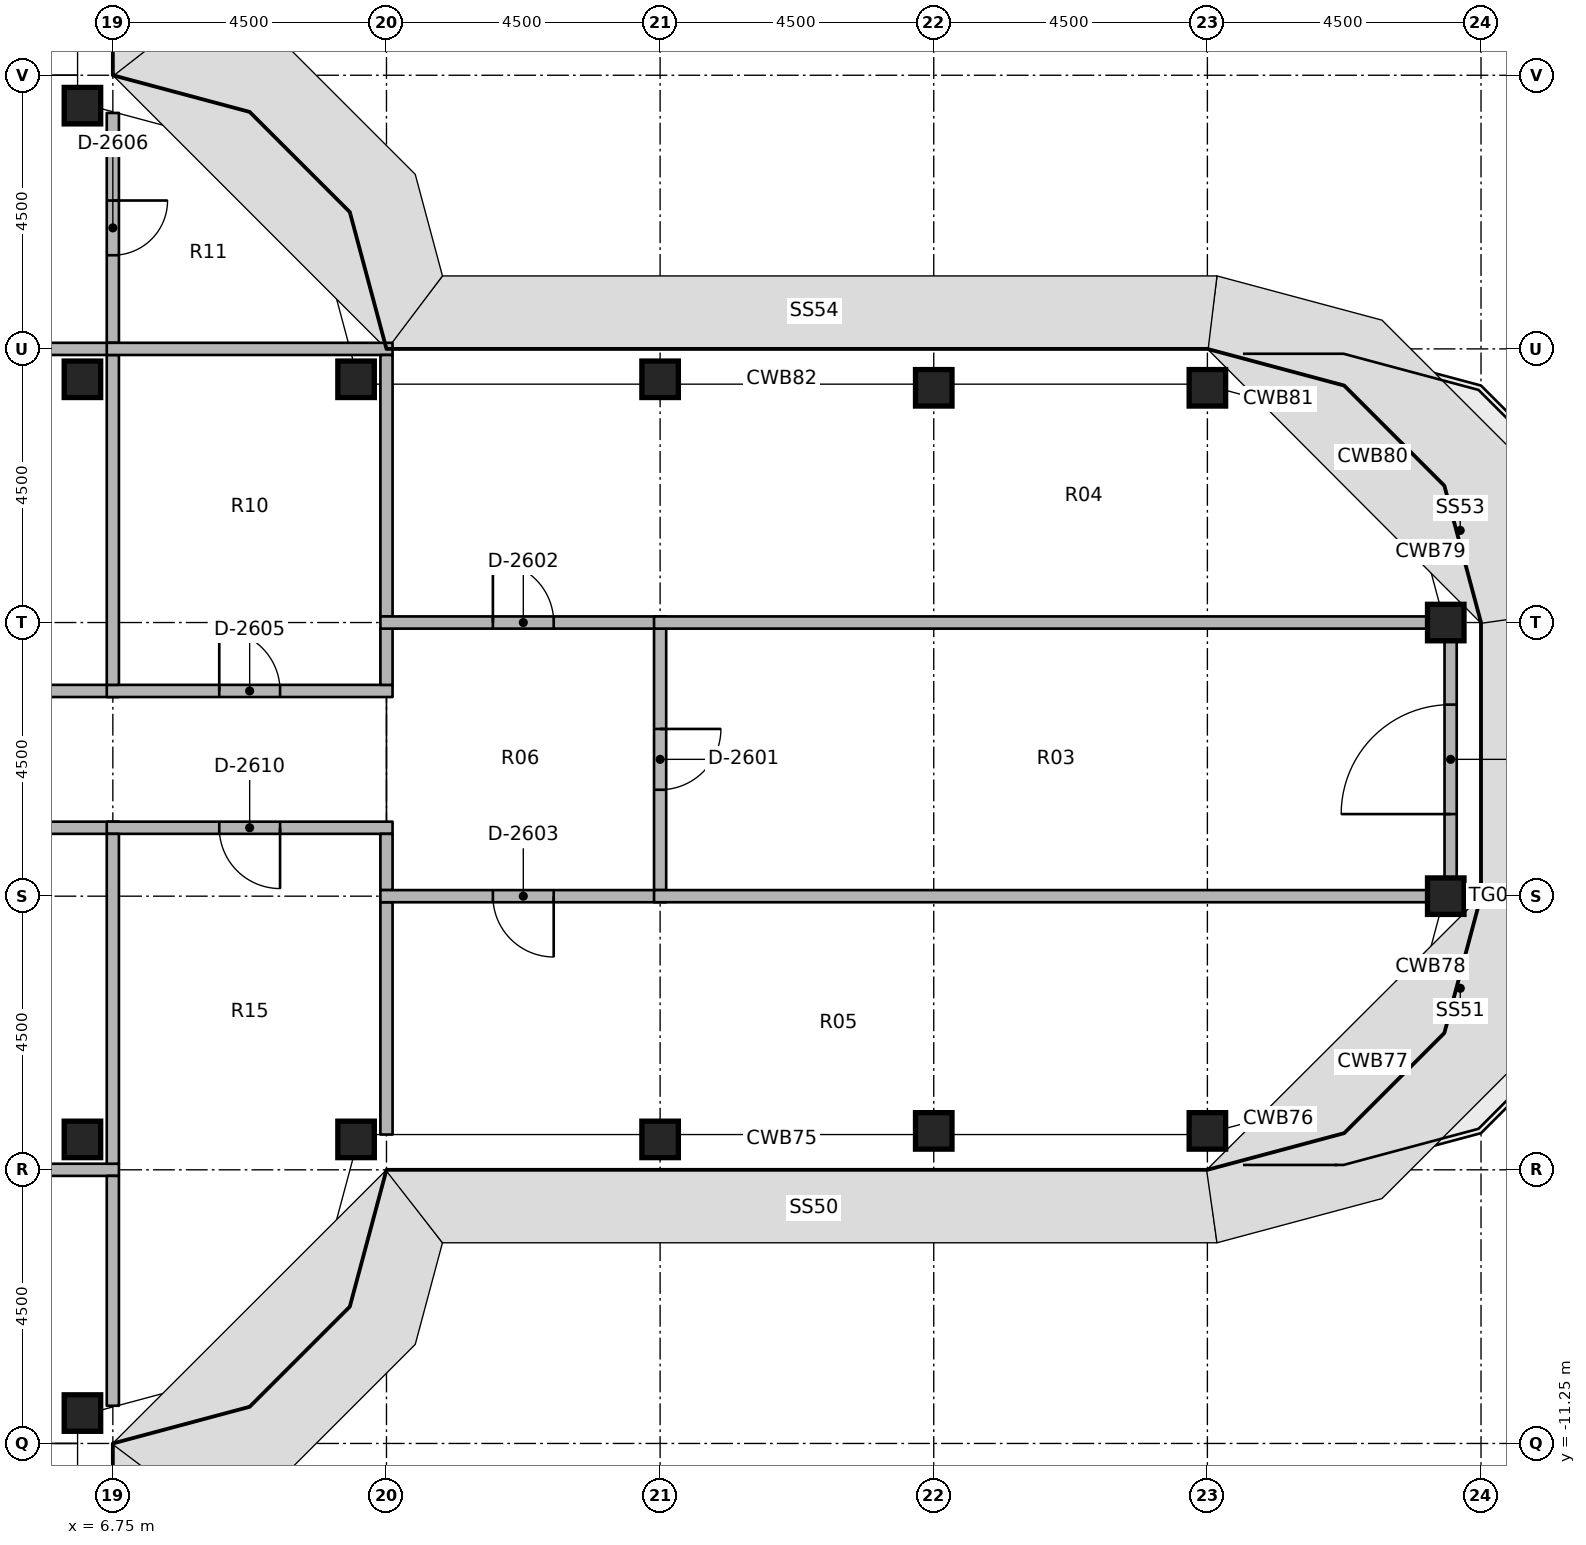
"""IFC4 building model, lengths in metres.
Left out: names, types, materials, properties, quantities, classifications, styles, units other than length and angle.
Written with IfcOpenShell. Run it as: python <this file> out.ifc"""

import sys

from ifc_helpers import new_model, si_unit, direction, frame, frame_2d, origin, origin_2d, place, context, subcontext, project, spatial, rectangle, extrude, element, fill, save


model = new_model("IFC4")
c1 = context("Model", 3, precision=1e-05, world=origin(), true_north=direction((0.0, 1.0)))
c2 = subcontext(c1, "Body", "Model", "MODEL_VIEW")
j1 = project(units=[si_unit("LENGTHUNIT", "METRE"), si_unit("PLANEANGLEUNIT", "RADIAN")], contexts=[c1])
p1 = place(None, origin())
s1 = spatial("IfcSite", under=j1, at=p1, CompositionType="ELEMENT")
p2 = place(p1, origin())
s2 = spatial("IfcBuilding", under=s1, at=p2, CompositionType="ELEMENT")
p3 = place(p2, frame((0.0, 0.0, 249.8)))
s3 = spatial("IfcBuildingStorey", under=s2, at=p3, CompositionType="ELEMENT", Elevation=249.8)
for number, where, z_axis, x_axis in (
    (1, (6.25, -10.75, 0.0), (0.0, 0.0, 1.0), (1.0, 0.0, 0.0)),
    (2, (6.25, -6.25, 0.0), (0.0, 0.0, 1.0), (1.0, 0.0, 0.0)),
    (3, (6.25, 6.25, 0.0), (0.0, 0.0, 1.0), (1.0, 0.0, 0.0)),
    (4, (6.25, 10.75, 0.0), (0.0, 0.0, 1.0), (1.0, 0.0, 0.0)),
    (5, (10.75, -6.25, 0.0), (0.0, 0.0, 1.0), (1.0, 0.0, 0.0)),
    (6, (10.75, 6.25, 0.0), (0.0, 0.0, 1.0), (1.0, 0.0, 0.0)),
    (7, (15.75, -6.25, 0.0), (0.0, 0.0, 1.0), (1.0, 0.0, 0.0)),
    (8, (15.75, 6.25, 0.0), (0.0, 0.0, 1.0), (1.0, 0.0, 0.0)),
    (9, (20.25, -6.11, 0.0), (0.0, 0.0, 1.0), (1.0, 0.0, 0.0)),
    (10, (20.25, 6.11, 0.0), (0.0, 0.0, 1.0), (1.0, 0.0, 0.0)),
    (11, (24.75, -6.11, 0.0), (0.0, 0.0, 1.0), (1.0, 0.0, 0.0)),
    (12, (24.75, 6.11, 0.0), (0.0, 0.0, 1.0), (1.0, 0.0, 0.0)),
    (13, (28.67, -2.25, 0.0), (0.0, 0.0, 1.0), (1.0, 0.0, 0.0)),
    (14, (28.67, 2.25, 0.0), (0.0, 0.0, 1.0), (1.0, 0.0, 0.0)),
):
    element("IfcColumn", number, at=place(p3, frame(where, z_axis=z_axis, x_axis=x_axis)), inside=s3, PredefinedType="COLUMN", context=c2, shape_type="SweptSolid", body=[
        extrude(rectangle(XDim=0.6, YDim=0.6, at=origin_2d()), origin(), (0.0, 0.0, 1.0), 3.65),
    ])
p4 = place(p3, frame((28.75, -1.95, 0.0), z_axis=(0.0, 0.0, 1.0), x_axis=(0.0, 1.0, 0.0)))
e15 = element("IfcWall", 15, at=p4, inside=s3, PredefinedType="SOLIDWALL", context=c2, shape_type="SweptSolid", body=[
    extrude(rectangle(XDim=3.9, YDim=0.2, at=frame_2d((1.95, 0.0))), origin(), (0.0, 0.0, 1.0), 2.75),
])
p5 = place(p4, frame((1.05, 0.0, 0.0)))
e16 = element("IfcOpeningElement", 16, at=p5, cuts=e15, PredefinedType="OPENING", context=c2, shape_type="SweptSolid", body=[
    extrude(rectangle(XDim=1.8, YDim=2.4, at=frame_2d((0.9, 1.2))), frame((0.0, 0.11, 0.0), z_axis=(0.0, -1.0, 0.0), x_axis=(1.0, 0.0, 0.0)), (0.0, 0.0, 1.0), 0.22),
])
p6 = place(p3, frame((1.025, 1.125, 0.0), z_axis=(0.0, 0.0, 1.0), x_axis=(1.0, 0.0, 0.0)))
e17 = element("IfcWall", 17, at=p6, inside=s3, PredefinedType="PARTITIONING", context=c2, shape_type="SweptSolid", body=[
    extrude(rectangle(XDim=5.825, YDim=0.2, at=frame_2d((2.913, 0.0))), origin(), (0.0, 0.0, 1.0), 2.75),
])
p7 = place(p6, frame((2.413, 0.0, 0.0)))
e18 = element("IfcOpeningElement", 18, at=p7, cuts=e17, PredefinedType="OPENING", context=c2, shape_type="SweptSolid", body=[
    extrude(rectangle(XDim=1.0, YDim=2.1, at=frame_2d((0.5, 1.05))), frame((0.0, 0.11, 0.0), z_axis=(0.0, -1.0, 0.0), x_axis=(1.0, 0.0, 0.0)), (0.0, 0.0, 1.0), 0.22),
])
p8 = place(p3, frame((6.65, 1.125, 0.0), z_axis=(0.0, 0.0, 1.0), x_axis=(1.0, 0.0, 0.0)))
e19 = element("IfcWall", 19, at=p8, inside=s3, PredefinedType="PARTITIONING", context=c2, shape_type="SweptSolid", body=[
    extrude(rectangle(XDim=4.7, YDim=0.2, at=frame_2d((2.35, 0.0))), origin(), (0.0, 0.0, 1.0), 2.75),
])
p9 = place(p8, frame((1.85, 0.0, 0.0)))
e20 = element("IfcOpeningElement", 20, at=p9, cuts=e19, PredefinedType="OPENING", context=c2, shape_type="SweptSolid", body=[
    extrude(rectangle(XDim=1.0, YDim=2.1, at=frame_2d((0.5, 1.05))), frame((0.0, 0.11, 0.0), z_axis=(0.0, -1.0, 0.0), x_axis=(1.0, 0.0, 0.0)), (0.0, 0.0, 1.0), 0.22),
])
p10 = place(p3, frame((6.85, -1.125, 0.0), z_axis=(0.0, 0.0, 1.0), x_axis=(-1.0, 0.0, 0.0)))
e21 = element("IfcWall", 21, at=p10, inside=s3, PredefinedType="PARTITIONING", context=c2, shape_type="SweptSolid", body=[
    extrude(rectangle(XDim=5.825, YDim=0.2, at=frame_2d((2.913, 0.0))), origin(), (0.0, 0.0, 1.0), 2.75),
])
p11 = place(p10, frame((2.413, 0.0, 0.0)))
e22 = element("IfcOpeningElement", 22, at=p11, cuts=e21, PredefinedType="OPENING", context=c2, shape_type="SweptSolid", body=[
    extrude(rectangle(XDim=1.0, YDim=2.1, at=frame_2d((0.5, 1.05))), frame((0.0, 0.11, 0.0), z_axis=(0.0, -1.0, 0.0), x_axis=(1.0, 0.0, 0.0)), (0.0, 0.0, 1.0), 0.22),
])
p12 = place(p3, frame((11.35, -1.125, 0.0), z_axis=(0.0, 0.0, 1.0), x_axis=(-1.0, 0.0, 0.0)))
e23 = element("IfcWall", 23, at=p12, inside=s3, PredefinedType="PARTITIONING", context=c2, shape_type="SweptSolid", body=[
    extrude(rectangle(XDim=4.7, YDim=0.2, at=frame_2d((2.35, 0.0))), origin(), (0.0, 0.0, 1.0), 2.75),
])
p13 = place(p12, frame((1.85, 0.0, 0.0)))
e24 = element("IfcOpeningElement", 24, at=p13, cuts=e23, PredefinedType="OPENING", context=c2, shape_type="SweptSolid", body=[
    extrude(rectangle(XDim=1.0, YDim=2.1, at=frame_2d((0.5, 1.05))), frame((0.0, 0.11, 0.0), z_axis=(0.0, -1.0, 0.0), x_axis=(1.0, 0.0, 0.0)), (0.0, 0.0, 1.0), 0.22),
])
p14 = place(p3, frame((1.025, 6.75, 0.0), z_axis=(0.0, 0.0, 1.0), x_axis=(1.0, 0.0, 0.0)))
e25 = element("IfcWall", 25, at=p14, inside=s3, PredefinedType="PARTITIONING", context=c2, shape_type="SweptSolid", body=[
    extrude(rectangle(XDim=5.825, YDim=0.2, at=frame_2d((2.913, 0.0))), origin(), (0.0, 0.0, 1.0), 2.75),
])
p15 = place(p3, frame((6.75, 10.63, 0.0), z_axis=(0.0, 0.0, 1.0), x_axis=(0.0, -1.0, 0.0)))
e26 = element("IfcWall", 26, at=p15, inside=s3, PredefinedType="PARTITIONING", context=c2, shape_type="SweptSolid", body=[
    extrude(rectangle(XDim=3.78, YDim=0.2, at=frame_2d((1.89, 0.0))), origin(), (0.0, 0.0, 1.0), 2.75),
])
p16 = place(p15, frame((1.44, 0.0, 0.0)))
e27 = element("IfcOpeningElement", 27, at=p16, cuts=e26, PredefinedType="OPENING", context=c2, shape_type="SweptSolid", body=[
    extrude(rectangle(XDim=0.9, YDim=2.1, at=frame_2d((0.45, 1.05))), frame((0.0, 0.11, 0.0), z_axis=(0.0, -1.0, 0.0), x_axis=(1.0, 0.0, 0.0)), (0.0, 0.0, 1.0), 0.22),
])
p17 = place(p3, frame((1.025, -6.75, 0.0), z_axis=(0.0, 0.0, 1.0), x_axis=(1.0, 0.0, 0.0)))
e28 = element("IfcWall", 28, at=p17, inside=s3, PredefinedType="PARTITIONING", context=c2, shape_type="SweptSolid", body=[
    extrude(rectangle(XDim=5.825, YDim=0.2, at=frame_2d((2.913, 0.0))), origin(), (0.0, 0.0, 1.0), 2.75),
])
p18 = place(p3, frame((6.75, -10.63, 0.0), z_axis=(0.0, 0.0, 1.0), x_axis=(0.0, 1.0, 0.0)))
e29 = element("IfcWall", 29, at=p18, inside=s3, PredefinedType="PARTITIONING", context=c2, shape_type="SweptSolid", body=[
    extrude(rectangle(XDim=3.78, YDim=0.2, at=frame_2d((1.89, 0.0))), origin(), (0.0, 0.0, 1.0), 2.75),
])
p19 = place(p3, frame((6.75, 1.225, 0.0), z_axis=(0.0, 0.0, 1.0), x_axis=(0.0, 1.0, 0.0)))
e30 = element("IfcWall", 30, at=p19, inside=s3, PredefinedType="PARTITIONING", context=c2, shape_type="SweptSolid", body=[
    extrude(rectangle(XDim=5.425, YDim=0.2, at=frame_2d((2.712, 0.0))), origin(), (0.0, 0.0, 1.0), 2.75),
])
p20 = place(p3, frame((6.65, 6.75, 0.0), z_axis=(0.0, 0.0, 1.0), x_axis=(1.0, 0.0, 0.0)))
e31 = element("IfcWall", 31, at=p20, inside=s3, PredefinedType="PARTITIONING", context=c2, shape_type="SweptSolid", body=[
    extrude(rectangle(XDim=4.7, YDim=0.2, at=frame_2d((2.35, 0.0))), origin(), (0.0, 0.0, 1.0), 2.75),
])
p21 = place(p3, frame((11.25, 1.225, 0.0), z_axis=(0.0, 0.0, 1.0), x_axis=(0.0, 1.0, 0.0)))
e32 = element("IfcWall", 32, at=p21, inside=s3, PredefinedType="PARTITIONING", context=c2, shape_type="SweptSolid", body=[
    extrude(rectangle(XDim=0.925, YDim=0.2, at=frame_2d((0.462, 0.0))), origin(), (0.0, 0.0, 1.0), 2.75),
])
p22 = place(p3, frame((11.25, 2.35, 0.0), z_axis=(0.0, 0.0, 1.0), x_axis=(0.0, 1.0, 0.0)))
e33 = element("IfcWall", 33, at=p22, inside=s3, PredefinedType="PARTITIONING", context=c2, shape_type="SweptSolid", body=[
    extrude(rectangle(XDim=4.3, YDim=0.2, at=frame_2d((2.15, 0.0))), origin(), (0.0, 0.0, 1.0), 2.75),
])
p23 = place(p3, frame((6.75, -6.65, 0.0), z_axis=(0.0, 0.0, 1.0), x_axis=(0.0, 1.0, 0.0)))
e34 = element("IfcWall", 34, at=p23, inside=s3, PredefinedType="PARTITIONING", context=c2, shape_type="SweptSolid", body=[
    extrude(rectangle(XDim=5.425, YDim=0.2, at=frame_2d((2.712, 0.0))), origin(), (0.0, 0.0, 1.0), 2.75),
])
p24 = place(p3, frame((11.25, -2.15, 0.0), z_axis=(0.0, 0.0, 1.0), x_axis=(0.0, 1.0, 0.0)))
e35 = element("IfcWall", 35, at=p24, inside=s3, PredefinedType="PARTITIONING", context=c2, shape_type="SweptSolid", body=[
    extrude(rectangle(XDim=0.925, YDim=0.2, at=frame_2d((0.462, 0.0))), origin(), (0.0, 0.0, 1.0), 2.75),
])
p25 = place(p3, frame((11.25, -6.17, 0.0), z_axis=(0.0, 0.0, 1.0), x_axis=(0.0, 1.0, 0.0)))
e36 = element("IfcWall", 36, at=p25, inside=s3, PredefinedType="PARTITIONING", context=c2, shape_type="SweptSolid", body=[
    extrude(rectangle(XDim=3.82, YDim=0.2, at=frame_2d((1.91, 0.0))), origin(), (0.0, 0.0, 1.0), 2.75),
])
p26 = place(p3, frame((11.15, 2.25, 0.0), z_axis=(0.0, 0.0, 1.0), x_axis=(1.0, 0.0, 0.0)))
e37 = element("IfcWall", 37, at=p26, inside=s3, PredefinedType="PARTITIONING", context=c2, shape_type="SweptSolid", body=[
    extrude(rectangle(XDim=4.7, YDim=0.2, at=frame_2d((2.35, 0.0))), origin(), (0.0, 0.0, 1.0), 2.75),
])
p27 = place(p26, frame((1.85, 0.0, 0.0)))
e38 = element("IfcOpeningElement", 38, at=p27, cuts=e37, PredefinedType="OPENING", context=c2, shape_type="SweptSolid", body=[
    extrude(rectangle(XDim=1.0, YDim=2.1, at=frame_2d((0.5, 1.05))), frame((0.0, 0.11, 0.0), z_axis=(0.0, -1.0, 0.0), x_axis=(1.0, 0.0, 0.0)), (0.0, 0.0, 1.0), 0.22),
])
p28 = place(p3, frame((15.85, -2.25, 0.0), z_axis=(0.0, 0.0, 1.0), x_axis=(-1.0, 0.0, 0.0)))
e39 = element("IfcWall", 39, at=p28, inside=s3, PredefinedType="PARTITIONING", context=c2, shape_type="SweptSolid", body=[
    extrude(rectangle(XDim=4.7, YDim=0.2, at=frame_2d((2.35, 0.0))), origin(), (0.0, 0.0, 1.0), 2.75),
])
p29 = place(p28, frame((1.85, 0.0, 0.0)))
e40 = element("IfcOpeningElement", 40, at=p29, cuts=e39, PredefinedType="OPENING", context=c2, shape_type="SweptSolid", body=[
    extrude(rectangle(XDim=1.0, YDim=2.1, at=frame_2d((0.5, 1.05))), frame((0.0, 0.11, 0.0), z_axis=(0.0, -1.0, 0.0), x_axis=(1.0, 0.0, 0.0)), (0.0, 0.0, 1.0), 0.22),
])
p30 = place(p3, frame((15.75, 2.15, 0.0), z_axis=(0.0, 0.0, 1.0), x_axis=(0.0, -1.0, 0.0)))
e41 = element("IfcWall", 41, at=p30, inside=s3, PredefinedType="PARTITIONING", context=c2, shape_type="SweptSolid", body=[
    extrude(rectangle(XDim=4.3, YDim=0.2, at=frame_2d((2.15, 0.0))), origin(), (0.0, 0.0, 1.0), 2.75),
])
p31 = place(p30, frame((1.65, 0.0, 0.0)))
e42 = element("IfcOpeningElement", 42, at=p31, cuts=e41, PredefinedType="OPENING", context=c2, shape_type="SweptSolid", body=[
    extrude(rectangle(XDim=1.0, YDim=2.1, at=frame_2d((0.5, 1.05))), frame((0.0, 0.11, 0.0), z_axis=(0.0, -1.0, 0.0), x_axis=(1.0, 0.0, 0.0)), (0.0, 0.0, 1.0), 0.22),
])
for number, where, z_axis, x_axis in (
    (43, (15.65, 2.25, 0.0), (0.0, 0.0, 1.0), (1.0, 0.0, 0.0)),
    (44, (15.65, -2.25, 0.0), (0.0, 0.0, 1.0), (1.0, 0.0, 0.0)),
):
    element("IfcWall", number, at=place(p3, frame(where, z_axis=z_axis, x_axis=x_axis)), inside=s3, PredefinedType="PARTITIONING", context=c2, shape_type="SweptSolid", body=[
        extrude(rectangle(XDim=12.72, YDim=0.2, at=frame_2d((6.36, 0.0))), origin(), (0.0, 0.0, 1.0), 2.75),
    ])
p32 = place(p5, origin())
e45 = element("IfcDoor", 45, at=p32, inside=s3, OperationType="SINGLE_SWING_LEFT", PredefinedType="DOOR", context=c2, shape_type="SweptSolid", body=[
    extrude(rectangle(XDim=1.8, YDim=2.4, at=frame_2d((0.9, 1.2))), frame((0.0, 0.025, 0.0), z_axis=(0.0, -1.0, 0.0), x_axis=(1.0, 0.0, 0.0)), (0.0, 0.0, 1.0), 0.05),
])
fill(e16, e45)
p33 = place(p31, origin())
e46 = element("IfcDoor", 46, at=p33, inside=s3, OperationType="SINGLE_SWING_RIGHT", PredefinedType="DOOR", context=c2, shape_type="SweptSolid", body=[
    extrude(rectangle(XDim=1.0, YDim=2.1, at=frame_2d((0.5, 1.05))), frame((0.0, 0.025, 0.0), z_axis=(0.0, -1.0, 0.0), x_axis=(1.0, 0.0, 0.0)), (0.0, 0.0, 1.0), 0.05),
])
fill(e42, e46)
p34 = place(p27, origin())
e47 = element("IfcDoor", 47, at=p34, inside=s3, OperationType="SINGLE_SWING_RIGHT", PredefinedType="DOOR", context=c2, shape_type="SweptSolid", body=[
    extrude(rectangle(XDim=1.0, YDim=2.1, at=frame_2d((0.5, 1.05))), frame((0.0, 0.025, 0.0), z_axis=(0.0, -1.0, 0.0), x_axis=(1.0, 0.0, 0.0)), (0.0, 0.0, 1.0), 0.05),
])
fill(e38, e47)
p35 = place(p29, origin())
e48 = element("IfcDoor", 48, at=p35, inside=s3, OperationType="SINGLE_SWING_RIGHT", PredefinedType="DOOR", context=c2, shape_type="SweptSolid", body=[
    extrude(rectangle(XDim=1.0, YDim=2.1, at=frame_2d((0.5, 1.05))), frame((0.0, 0.025, 0.0), z_axis=(0.0, -1.0, 0.0), x_axis=(1.0, 0.0, 0.0)), (0.0, 0.0, 1.0), 0.05),
])
fill(e40, e48)
p36 = place(p9, origin())
e49 = element("IfcDoor", 49, at=p36, inside=s3, OperationType="SINGLE_SWING_RIGHT", PredefinedType="DOOR", context=c2, shape_type="SweptSolid", body=[
    extrude(rectangle(XDim=1.0, YDim=2.1, at=frame_2d((0.5, 1.05))), frame((0.0, 0.025, 0.0), z_axis=(0.0, -1.0, 0.0), x_axis=(1.0, 0.0, 0.0)), (0.0, 0.0, 1.0), 0.05),
])
fill(e20, e49)
p37 = place(p16, origin())
e50 = element("IfcDoor", 50, at=p37, inside=s3, OperationType="SINGLE_SWING_RIGHT", PredefinedType="DOOR", context=c2, shape_type="SweptSolid", body=[
    extrude(rectangle(XDim=0.9, YDim=2.1, at=frame_2d((0.45, 1.05))), frame((0.0, 0.025, 0.0), z_axis=(0.0, -1.0, 0.0), x_axis=(1.0, 0.0, 0.0)), (0.0, 0.0, 1.0), 0.05),
])
fill(e27, e50)
p38 = place(p13, origin())
e51 = element("IfcDoor", 51, at=p38, inside=s3, OperationType="SINGLE_SWING_RIGHT", PredefinedType="DOOR", context=c2, shape_type="SweptSolid", body=[
    extrude(rectangle(XDim=1.0, YDim=2.1, at=frame_2d((0.5, 1.05))), frame((0.0, 0.025, 0.0), z_axis=(0.0, -1.0, 0.0), x_axis=(1.0, 0.0, 0.0)), (0.0, 0.0, 1.0), 0.05),
])
fill(e24, e51)
save(model, sys.argv[1])
